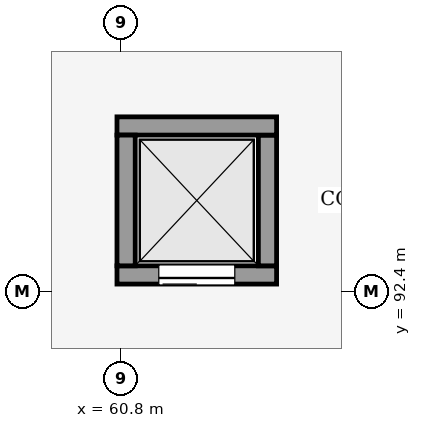
"""IFC4 building model, lengths in metres.
Left out: names, types, materials, properties, quantities, classifications, styles, units other than length and angle.
Written with IfcOpenShell. Run it as: python <this file> out.ifc"""

import sys

from ifc_helpers import new_model, si_unit, direction, frame, frame_2d, origin, place, context, subcontext, project, spatial, rectangle, extrude, element, fill, save


model = new_model("IFC4")
c1 = context("Model", 3, precision=1e-05, world=origin(), true_north=direction((0.0, 1.0)))
c2 = subcontext(c1, "Body", "Model", "MODEL_VIEW")
j1 = project(units=[si_unit("LENGTHUNIT", "METRE"), si_unit("PLANEANGLEUNIT", "RADIAN")], contexts=[c1])
p1 = place(None, origin())
s1 = spatial("IfcSite", under=j1, at=p1, CompositionType="ELEMENT")
p2 = place(p1, origin())
s2 = spatial("IfcBuilding", under=s1, at=p2, CompositionType="ELEMENT")
p3 = place(p2, origin())
s3 = spatial("IfcBuildingStorey", under=s2, at=p3, CompositionType="ELEMENT", Elevation=0.0)
p4 = place(p3, frame((62.85, 92.62, 0.0), z_axis=(0.0, 0.0, 1.0), x_axis=(-1.0, 0.0, 0.0)))
e1 = element("IfcWall", 1, at=p4, inside=s3, PredefinedType="SHEAR", context=c2, shape_type="SweptSolid", body=[
    extrude(rectangle(XDim=2.1, YDim=0.24, at=frame_2d((1.05, 0.0))), origin(), (0.0, 0.0, 1.0), 5.1),
])
p5 = place(p4, frame((0.55, 0.0, 0.0)))
e2 = element("IfcOpeningElement", 2, at=p5, cuts=e1, PredefinedType="OPENING", context=c2, shape_type="SweptSolid", body=[
    extrude(rectangle(XDim=1.0, YDim=2.15, at=frame_2d((0.5, 1.075))), frame((0.0, 0.13, 0.0), z_axis=(0.0, -1.0, 0.0), x_axis=(1.0, 0.0, 0.0)), (0.0, 0.0, 1.0), 0.26),
])
p6 = place(p3, frame((62.73, 94.46, 0.0), z_axis=(0.0, 0.0, 1.0), x_axis=(0.0, -1.0, 0.0)))
e3 = element("IfcWall", 3, at=p6, inside=s3, PredefinedType="SHEAR", context=c2, shape_type="SweptSolid", body=[
    extrude(rectangle(XDim=1.72, YDim=0.24, at=frame_2d((0.86, 0.0))), origin(), (0.0, 0.0, 1.0), 5.1),
])
p7 = place(p3, frame((60.75, 94.58, 0.0), z_axis=(0.0, 0.0, 1.0), x_axis=(1.0, 0.0, 0.0)))
e4 = element("IfcWall", 4, at=p7, inside=s3, PredefinedType="SHEAR", context=c2, shape_type="SweptSolid", body=[
    extrude(rectangle(XDim=2.1, YDim=0.24, at=frame_2d((1.05, 0.0))), origin(), (0.0, 0.0, 1.0), 5.1),
])
p8 = place(p3, frame((60.87, 92.74, 0.0), z_axis=(0.0, 0.0, 1.0), x_axis=(0.0, 1.0, 0.0)))
e5 = element("IfcWall", 5, at=p8, inside=s3, PredefinedType="SHEAR", context=c2, shape_type="SweptSolid", body=[
    extrude(rectangle(XDim=1.72, YDim=0.24, at=frame_2d((0.86, 0.0))), origin(), (0.0, 0.0, 1.0), 5.1),
])
p9 = place(p5, origin())
e6 = element("IfcDoor", 6, at=p9, inside=s3, OperationType="SLIDING_TO_RIGHT", PredefinedType="DOOR", context=c2, shape_type="SweptSolid", body=[
    extrude(rectangle(XDim=1.0, YDim=2.15, at=frame_2d((0.5, 1.075))), frame((0.0, 0.025, 0.0), z_axis=(0.0, -1.0, 0.0), x_axis=(1.0, 0.0, 0.0)), (0.0, 0.0, 1.0), 0.05),
])
fill(e2, e6)
save(model, sys.argv[1])
